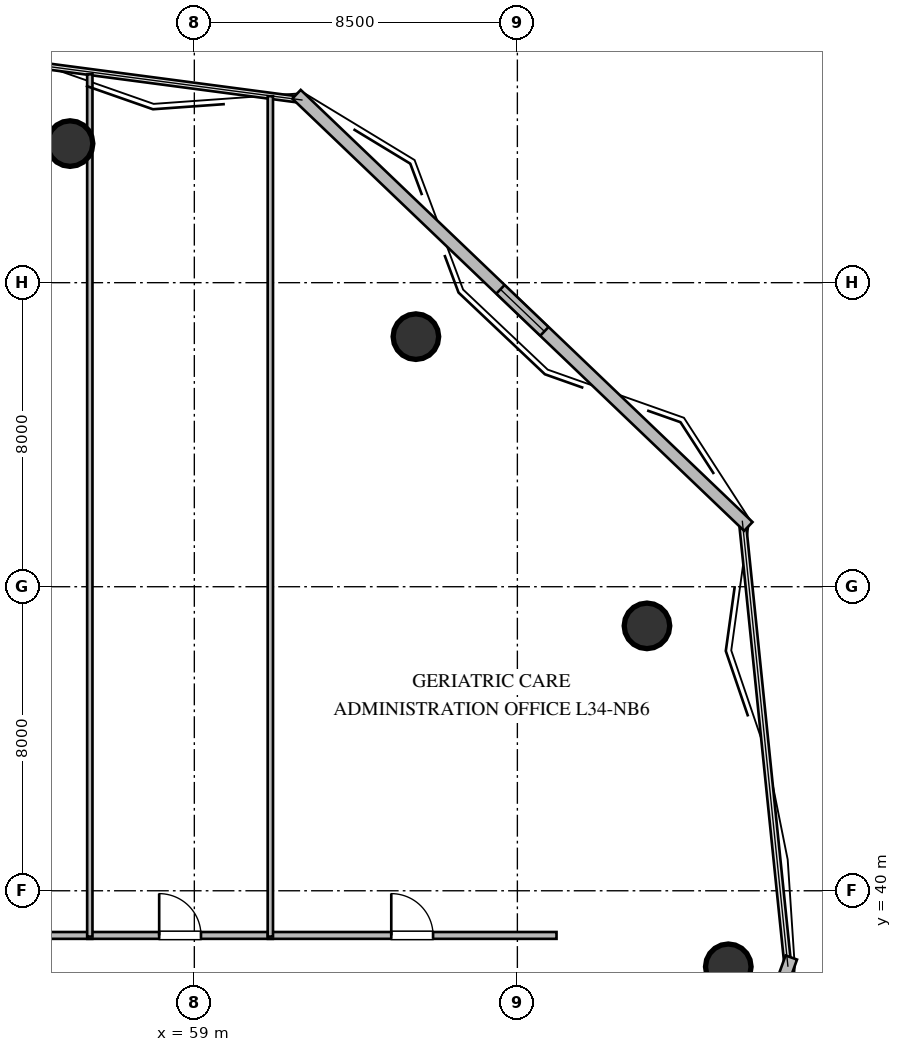
"""IFC4 building model, lengths in metres.
Left out: names, types, materials, properties, quantities, classifications, styles, units other than length and angle.
Written with IfcOpenShell. Run it as: python <this file> out.ifc"""

import sys

from ifc_helpers import new_model, si_unit, direction, frame, frame_2d, origin, origin_2d, place, context, subcontext, project, spatial, rectangle, circle, extrude, element, fill, save


model = new_model("IFC4")
c1 = context("Model", 3, precision=1e-05, world=origin(), true_north=direction((0.0, 1.0)))
c2 = subcontext(c1, "Body", "Model", "MODEL_VIEW")
j1 = project(units=[si_unit("LENGTHUNIT", "METRE"), si_unit("PLANEANGLEUNIT", "RADIAN")], contexts=[c1])
p1 = place(None, origin())
s1 = spatial("IfcSite", under=j1, at=p1, CompositionType="ELEMENT")
p2 = place(p1, origin())
s2 = spatial("IfcBuilding", under=s1, at=p2, CompositionType="ELEMENT")
p3 = place(p2, frame((0.0, 0.0, 131.4)))
s3 = spatial("IfcBuildingStorey", under=s2, at=p3, CompositionType="ELEMENT", Elevation=131.4)
for number, where, z_axis, x_axis in (
    (1, (73.05, 38.0, 0.0), (0.0, 0.0, 1.0), (1.0, 0.0, 0.0)),
    (2, (70.91, 46.97, 0.0), (0.0, 0.0, 1.0), (1.0, 0.0, 0.0)),
    (3, (64.83, 54.58, 0.0), (0.0, 0.0, 1.0), (1.0, 0.0, 0.0)),
    (4, (55.73, 59.66, 0.0), (0.0, 0.0, 1.0), (1.0, 0.0, 0.0)),
):
    element("IfcColumn", number, at=place(p3, frame(where, z_axis=z_axis, x_axis=x_axis)), inside=s3, PredefinedType="COLUMN", context=c2, shape_type="SweptSolid", body=[
        extrude(circle(Radius=0.6, at=origin_2d()), origin(), (0.0, 0.0, 1.0), 3.6),
    ])
p4 = place(p3, frame((74.708, 38.244, 0.0), z_axis=(0.0, 0.0, 1.0), x_axis=(-0.340324669139, -0.94030799187, 0.0)))
e5 = element("IfcWall", 5, at=p4, inside=s3, PredefinedType="STANDARD", context=c2, shape_type="SweptSolid", body=[
    extrude(rectangle(XDim=13.81, YDim=0.32, at=frame_2d((6.905, 0.0))), origin(), (0.0, 0.0, 1.0), 3.36),
])
p5 = place(p3, frame((61.689, 60.957, 0.0), z_axis=(0.0, 0.0, 1.0), x_axis=(0.722641212534, -0.691223319881, 0.0)))
e6 = element("IfcWall", 6, at=p5, inside=s3, PredefinedType="STANDARD", context=c2, shape_type="SweptSolid", body=[
    extrude(rectangle(XDim=16.451, YDim=0.32, at=frame_2d((8.225, 0.0))), origin(), (0.0, 0.0, 1.0), 3.36),
])
p6 = place(p5, frame((7.425, 0.0, 1.05)))
e7 = element("IfcOpeningElement", 7, at=p6, cuts=e6, PredefinedType="OPENING", context=c2, shape_type="SweptSolid", body=[
    extrude(rectangle(XDim=1.6, YDim=1.5, at=frame_2d((0.8, 0.75))), frame((0.0, 0.17, 0.0), z_axis=(0.0, -1.0, 0.0), x_axis=(1.0, 0.0, 0.0)), (0.0, 0.0, 1.0), 0.34),
])
p7 = place(p3, frame((51.435, 38.825, 0.0), z_axis=(0.0, 0.0, 1.0), x_axis=(1.0, 0.0, 0.0)))
e8 = element("IfcWall", 8, at=p7, inside=s3, PredefinedType="PARTITIONING", context=c2, shape_type="SweptSolid", body=[
    extrude(rectangle(XDim=4.88, YDim=0.18, at=frame_2d((2.44, 0.0))), origin(), (0.0, 0.0, 1.0), 3.36),
])
p8 = place(p7, frame((1.89, 0.0, 0.0)))
e9 = element("IfcOpeningElement", 9, at=p8, cuts=e8, PredefinedType="OPENING", context=c2, shape_type="SweptSolid", body=[
    extrude(rectangle(XDim=1.1, YDim=2.1, at=frame_2d((0.55, 1.05))), frame((0.0, 0.1, 0.0), z_axis=(0.0, -1.0, 0.0), x_axis=(1.0, 0.0, 0.0)), (0.0, 0.0, 1.0), 0.2),
])
p9 = place(p3, frame((56.185, 38.825, 0.0), z_axis=(0.0, 0.0, 1.0), x_axis=(1.0, 0.0, 0.0)))
e10 = element("IfcWall", 10, at=p9, inside=s3, PredefinedType="PARTITIONING", context=c2, shape_type="SweptSolid", body=[
    extrude(rectangle(XDim=4.88, YDim=0.18, at=frame_2d((2.44, 0.0))), origin(), (0.0, 0.0, 1.0), 3.36),
])
p10 = place(p9, frame((1.89, 0.0, 0.0)))
e11 = element("IfcOpeningElement", 11, at=p10, cuts=e10, PredefinedType="OPENING", context=c2, shape_type="SweptSolid", body=[
    extrude(rectangle(XDim=1.1, YDim=2.1, at=frame_2d((0.55, 1.05))), frame((0.0, 0.1, 0.0), z_axis=(0.0, -1.0, 0.0), x_axis=(1.0, 0.0, 0.0)), (0.0, 0.0, 1.0), 0.2),
])
p11 = place(p3, frame((60.935, 38.825, 0.0), z_axis=(0.0, 0.0, 1.0), x_axis=(1.0, 0.0, 0.0)))
e12 = element("IfcWall", 12, at=p11, inside=s3, PredefinedType="PARTITIONING", context=c2, shape_type="SweptSolid", body=[
    extrude(rectangle(XDim=7.595, YDim=0.18, at=frame_2d((3.797, 0.0))), origin(), (0.0, 0.0, 1.0), 3.36),
])
p12 = place(p11, frame((3.247, 0.0, 0.0)))
e13 = element("IfcOpeningElement", 13, at=p12, cuts=e12, PredefinedType="OPENING", context=c2, shape_type="SweptSolid", body=[
    extrude(rectangle(XDim=1.1, YDim=2.1, at=frame_2d((0.55, 1.05))), frame((0.0, 0.1, 0.0), z_axis=(0.0, -1.0, 0.0), x_axis=(1.0, 0.0, 0.0)), (0.0, 0.0, 1.0), 0.2),
])
p13 = place(p3, frame((56.25, 61.482, 0.0), z_axis=(0.0, 0.0, 1.0), x_axis=(0.0, -1.0, 0.0)))
e14 = element("IfcWall", 14, at=p13, inside=s3, PredefinedType="PARTITIONING", context=c2, shape_type="SweptSolid", body=[
    extrude(rectangle(XDim=22.687, YDim=0.14, at=frame_2d((11.344, 0.0))), origin(), (0.0, 0.0, 1.0), 3.36),
])
p14 = place(p3, frame((61.0, 60.907, 0.0), z_axis=(0.0, 0.0, 1.0), x_axis=(0.0, -1.0, 0.0)))
e15 = element("IfcWall", 15, at=p14, inside=s3, PredefinedType="PARTITIONING", context=c2, shape_type="SweptSolid", body=[
    extrude(rectangle(XDim=22.112, YDim=0.14, at=frame_2d((11.056, 0.0))), origin(), (0.0, 0.0, 1.0), 3.36),
])
p15 = place(p6, origin())
e16 = element("IfcWindow", 16, at=p15, inside=s3, PartitioningType="SINGLE_PANEL", PredefinedType="WINDOW", context=c2, shape_type="SweptSolid", body=[
    extrude(rectangle(XDim=1.6, YDim=1.5, at=frame_2d((0.8, 0.75))), frame((0.0, 0.03, 0.0), z_axis=(0.0, -1.0, 0.0), x_axis=(1.0, 0.0, 0.0)), (0.0, 0.0, 1.0), 0.06),
])
fill(e7, e16)
p16 = place(p10, origin())
e17 = element("IfcDoor", 17, at=p16, inside=s3, OperationType="SINGLE_SWING_LEFT", PredefinedType="DOOR", context=c2, shape_type="SweptSolid", body=[
    extrude(rectangle(XDim=1.1, YDim=2.1, at=frame_2d((0.55, 1.05))), frame((0.0, 0.025, 0.0), z_axis=(0.0, -1.0, 0.0), x_axis=(1.0, 0.0, 0.0)), (0.0, 0.0, 1.0), 0.05),
])
fill(e11, e17)
p17 = place(p12, origin())
e18 = element("IfcDoor", 18, at=p17, inside=s3, OperationType="SINGLE_SWING_LEFT", PredefinedType="DOOR", context=c2, shape_type="SweptSolid", body=[
    extrude(rectangle(XDim=1.1, YDim=2.1, at=frame_2d((0.55, 1.05))), frame((0.0, 0.025, 0.0), z_axis=(0.0, -1.0, 0.0), x_axis=(1.0, 0.0, 0.0)), (0.0, 0.0, 1.0), 0.05),
])
fill(e13, e18)
save(model, sys.argv[1])
